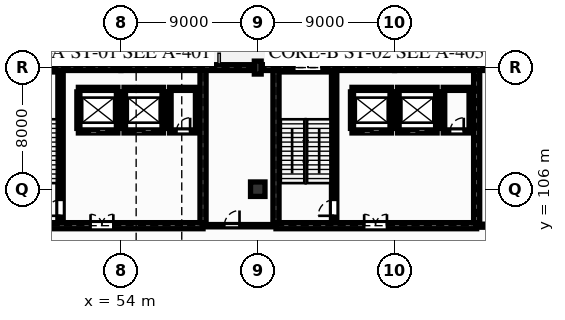
"""IFC4 building model, lengths in metres.
Left out: names, types, materials, properties, quantities, classifications, styles, units other than length and angle.
Written with IfcOpenShell. Run it as: python <this file> out.ifc"""

import sys

from ifc_helpers import new_model, si_unit, direction, frame, frame_2d, origin, origin_2d, place, context, subcontext, project, spatial, rectangle, extrude, element, fill, save


model = new_model("IFC4")
c1 = context("Model", 3, precision=1e-05, world=origin(), true_north=direction((0.0, 1.0)))
c2 = subcontext(c1, "Body", "Model", "MODEL_VIEW")
j1 = project(units=[si_unit("LENGTHUNIT", "METRE"), si_unit("PLANEANGLEUNIT", "RADIAN")], contexts=[c1])
p1 = place(None, origin())
s1 = spatial("IfcSite", under=j1, at=p1, CompositionType="ELEMENT")
p2 = place(p1, origin())
s2 = spatial("IfcBuilding", under=s1, at=p2, CompositionType="ELEMENT")
p3 = place(p2, origin())
s3 = spatial("IfcBuildingStorey", under=s2, at=p3, CompositionType="ELEMENT", Elevation=0.0)
p4 = place(p3, frame((63.0, 106.0, 0.0), z_axis=(0.0, 0.0, 1.0), x_axis=(1.0, 0.0, 0.0)))
e1 = element("IfcColumn", 1, at=p4, inside=s3, PredefinedType="COLUMN", context=c2, shape_type="SweptSolid", body=[
    extrude(rectangle(XDim=0.95, YDim=0.95, at=origin_2d()), origin(), (0.0, 0.0, 1.0), 5.1),
])
p5 = place(p3, frame((63.0, 114.0, 0.0), z_axis=(0.0, 0.0, 1.0), x_axis=(0.0, 1.0, 0.0)))
e2 = element("IfcColumn", 2, at=p5, inside=s3, PredefinedType="COLUMN", context=c2, shape_type="SweptSolid", body=[
    extrude(rectangle(XDim=0.45, YDim=0.85, at=origin_2d()), origin(), (0.0, 0.0, 1.0), 5.1),
])
p6 = place(p3, frame((45.0, 114.0, 0.0), z_axis=(0.0, 0.0, 1.0), x_axis=(1.0, 0.0, 0.0)))
e3 = element("IfcWall", 3, at=p6, inside=s3, PredefinedType="SOLIDWALL", context=c2, shape_type="SweptSolid", body=[
    extrude(rectangle(XDim=9.0, YDim=0.38, at=frame_2d((4.5, 0.0))), origin(), (0.0, 0.0, 1.0), 4.8),
])
p7 = place(p6, frame((2.4, 0.0, 0.0)))
e4 = element("IfcOpeningElement", 4, at=p7, cuts=e3, PredefinedType="OPENING", context=c2, shape_type="SweptSolid", body=[
    extrude(rectangle(XDim=1.8, YDim=2.4, at=frame_2d((0.9, 1.2))), frame((0.0, 0.2, 0.0), z_axis=(0.0, -1.0, 0.0), x_axis=(1.0, 0.0, 0.0)), (0.0, 0.0, 1.0), 0.4),
])
p8 = place(p3, frame((54.0, 114.0, 0.0), z_axis=(0.0, 0.0, 1.0), x_axis=(1.0, 0.0, 0.0)))
e5 = element("IfcWall", 5, at=p8, inside=s3, PredefinedType="SOLIDWALL", context=c2, shape_type="SweptSolid", body=[
    extrude(rectangle(XDim=9.0, YDim=0.38, at=frame_2d((4.5, 0.0))), origin(), (0.0, 0.0, 1.0), 4.8),
])
p9 = place(p8, frame((2.2, 0.0, 1.15)))
e6 = element("IfcOpeningElement", 6, at=p9, cuts=e5, PredefinedType="OPENING", context=c2, shape_type="SweptSolid", body=[
    extrude(rectangle(XDim=0.75, YDim=2.2, at=frame_2d((0.375, 1.1))), frame((0.0, 0.2, 0.0), z_axis=(0.0, -1.0, 0.0), x_axis=(1.0, 0.0, 0.0)), (0.0, 0.0, 1.0), 0.4),
])
p10 = place(p3, frame((63.0, 114.0, 0.0), z_axis=(0.0, 0.0, 1.0), x_axis=(1.0, 0.0, 0.0)))
e7 = element("IfcWall", 7, at=p10, inside=s3, PredefinedType="SOLIDWALL", context=c2, shape_type="SweptSolid", body=[
    extrude(rectangle(XDim=9.0, YDim=0.38, at=frame_2d((4.5, 0.0))), origin(), (0.0, 0.0, 1.0), 4.8),
])
p11 = place(p10, frame((2.4, 0.0, 0.0)))
e8 = element("IfcOpeningElement", 8, at=p11, cuts=e7, PredefinedType="OPENING", context=c2, shape_type="SweptSolid", body=[
    extrude(rectangle(XDim=1.8, YDim=2.4, at=frame_2d((0.9, 1.2))), frame((0.0, 0.2, 0.0), z_axis=(0.0, -1.0, 0.0), x_axis=(1.0, 0.0, 0.0)), (0.0, 0.0, 1.0), 0.4),
])
p12 = place(p3, frame((72.0, 114.0, 0.0), z_axis=(0.0, 0.0, 1.0), x_axis=(1.0, 0.0, 0.0)))
e9 = element("IfcWall", 9, at=p12, inside=s3, PredefinedType="SOLIDWALL", context=c2, shape_type="SweptSolid", body=[
    extrude(rectangle(XDim=9.0, YDim=0.38, at=frame_2d((4.5, 0.0))), origin(), (0.0, 0.0, 1.0), 4.8),
])
p13 = place(p12, frame((2.2, 0.0, 1.15)))
e10 = element("IfcOpeningElement", 10, at=p13, cuts=e9, PredefinedType="OPENING", context=c2, shape_type="SweptSolid", body=[
    extrude(rectangle(XDim=0.75, YDim=2.2, at=frame_2d((0.375, 1.1))), frame((0.0, 0.2, 0.0), z_axis=(0.0, -1.0, 0.0), x_axis=(1.0, 0.0, 0.0)), (0.0, 0.0, 1.0), 0.4),
])
p14 = place(p3, frame((46.2, 103.6, 0.0), z_axis=(0.0, 0.0, 1.0), x_axis=(1.0, 0.0, 0.0)))
e11 = element("IfcWall", 11, at=p14, inside=s3, PredefinedType="SHEAR", context=c2, shape_type="SweptSolid", body=[
    extrude(rectangle(XDim=13.2, YDim=0.4, at=frame_2d((6.6, 0.0))), origin(), (0.0, 0.0, 1.0), 4.8),
])
p15 = place(p14, frame((5.8, 0.0, 0.0)))
e12 = element("IfcOpeningElement", 12, at=p15, cuts=e11, PredefinedType="OPENING", context=c2, shape_type="SweptSolid", body=[
    extrude(rectangle(XDim=1.5, YDim=2.2, at=frame_2d((0.75, 1.1))), frame((0.0, 0.21, 0.0), z_axis=(0.0, -1.0, 0.0), x_axis=(1.0, 0.0, 0.0)), (0.0, 0.0, 1.0), 0.42),
])
p16 = place(p3, frame((59.4, 103.8, 0.0), z_axis=(0.0, 0.0, 1.0), x_axis=(0.0, 1.0, 0.0)))
e13 = element("IfcWall", 13, at=p16, inside=s3, PredefinedType="SHEAR", context=c2, shape_type="SweptSolid", body=[
    extrude(rectangle(XDim=10.01, YDim=0.4, at=frame_2d((5.005, 0.0))), origin(), (0.0, 0.0, 1.0), 4.8),
])
p17 = place(p3, frame((50.025, 103.8, 0.0), z_axis=(0.0, 0.0, 1.0), x_axis=(0.0, 1.0, 0.0)))
e14 = element("IfcWall", 14, at=p17, inside=s3, PredefinedType="SHEAR", context=c2, shape_type="SweptSolid", body=[
    extrude(rectangle(XDim=10.01, YDim=0.35, at=frame_2d((5.005, 0.0))), origin(), (0.0, 0.0, 1.0), 4.8),
])
p18 = place(p17, frame((0.45, 0.0, 0.0)))
e15 = element("IfcOpeningElement", 15, at=p18, cuts=e14, PredefinedType="OPENING", context=c2, shape_type="SweptSolid", body=[
    extrude(rectangle(XDim=1.05, YDim=2.2, at=frame_2d((0.525, 1.1))), frame((0.0, 0.185, 0.0), z_axis=(0.0, -1.0, 0.0), x_axis=(1.0, 0.0, 0.0)), (0.0, 0.0, 1.0), 0.37),
])
p19 = place(p3, frame((51.2, 109.8, 0.0), z_axis=(0.0, 0.0, 1.0), x_axis=(1.0, 0.0, 0.0)))
e16 = element("IfcWall", 16, at=p19, inside=s3, PredefinedType="PARTITIONING", context=c2, shape_type="SweptSolid", body=[
    extrude(rectangle(XDim=2.6, YDim=0.2, at=frame_2d((1.3, 0.0))), origin(), (0.0, 0.0, 1.0), 4.8),
])
p20 = place(p19, frame((0.75, 0.0, 0.0)))
e17 = element("IfcOpeningElement", 17, at=p20, cuts=e16, PredefinedType="OPENING", context=c2, shape_type="SweptSolid", body=[
    extrude(rectangle(XDim=1.1, YDim=2.15, at=frame_2d((0.55, 1.075))), frame((0.0, 0.11, 0.0), z_axis=(0.0, -1.0, 0.0), x_axis=(1.0, 0.0, 0.0)), (0.0, 0.0, 1.0), 0.22),
])
p21 = place(p3, frame((51.2, 112.6, 0.0), z_axis=(0.0, 0.0, 1.0), x_axis=(1.0, 0.0, 0.0)))
e18 = element("IfcWall", 18, at=p21, inside=s3, PredefinedType="PARTITIONING", context=c2, shape_type="SweptSolid", body=[
    extrude(rectangle(XDim=2.6, YDim=0.2, at=frame_2d((1.3, 0.0))), origin(), (0.0, 0.0, 1.0), 4.8),
])
for number, where, z_axis, x_axis in (
    (19, (51.2, 110.0, 0.0), (0.0, 0.0, 1.0), (0.0, 1.0, 0.0)),
    (20, (53.8, 110.0, 0.0), (0.0, 0.0, 1.0), (0.0, 1.0, 0.0)),
):
    element("IfcWall", number, at=place(p3, frame(where, z_axis=z_axis, x_axis=x_axis)), inside=s3, PredefinedType="PARTITIONING", context=c2, shape_type="SweptSolid", body=[
        extrude(rectangle(XDim=2.4, YDim=0.2, at=frame_2d((1.2, 0.0))), origin(), (0.0, 0.0, 1.0), 4.8),
    ])
p22 = place(p3, frame((54.2, 109.8, 0.0), z_axis=(0.0, 0.0, 1.0), x_axis=(1.0, 0.0, 0.0)))
e21 = element("IfcWall", 21, at=p22, inside=s3, PredefinedType="PARTITIONING", context=c2, shape_type="SweptSolid", body=[
    extrude(rectangle(XDim=2.6, YDim=0.2, at=frame_2d((1.3, 0.0))), origin(), (0.0, 0.0, 1.0), 4.8),
])
p23 = place(p22, frame((0.75, 0.0, 0.0)))
e22 = element("IfcOpeningElement", 22, at=p23, cuts=e21, PredefinedType="OPENING", context=c2, shape_type="SweptSolid", body=[
    extrude(rectangle(XDim=1.1, YDim=2.15, at=frame_2d((0.55, 1.075))), frame((0.0, 0.11, 0.0), z_axis=(0.0, -1.0, 0.0), x_axis=(1.0, 0.0, 0.0)), (0.0, 0.0, 1.0), 0.22),
])
p24 = place(p3, frame((54.2, 112.6, 0.0), z_axis=(0.0, 0.0, 1.0), x_axis=(1.0, 0.0, 0.0)))
e23 = element("IfcWall", 23, at=p24, inside=s3, PredefinedType="PARTITIONING", context=c2, shape_type="SweptSolid", body=[
    extrude(rectangle(XDim=2.6, YDim=0.2, at=frame_2d((1.3, 0.0))), origin(), (0.0, 0.0, 1.0), 4.8),
])
for number, where, z_axis, x_axis in (
    (24, (54.2, 110.0, 0.0), (0.0, 0.0, 1.0), (0.0, 1.0, 0.0)),
    (25, (56.8, 110.0, 0.0), (0.0, 0.0, 1.0), (0.0, 1.0, 0.0)),
):
    element("IfcWall", number, at=place(p3, frame(where, z_axis=z_axis, x_axis=x_axis)), inside=s3, PredefinedType="PARTITIONING", context=c2, shape_type="SweptSolid", body=[
        extrude(rectangle(XDim=2.4, YDim=0.2, at=frame_2d((1.2, 0.0))), origin(), (0.0, 0.0, 1.0), 4.8),
    ])
p25 = place(p3, frame((57.2, 109.8, 0.0), z_axis=(0.0, 0.0, 1.0), x_axis=(1.0, 0.0, 0.0)))
e26 = element("IfcWall", 26, at=p25, inside=s3, PredefinedType="PARTITIONING", context=c2, shape_type="SweptSolid", body=[
    extrude(rectangle(XDim=1.8, YDim=0.2, at=frame_2d((0.9, 0.0))), origin(), (0.0, 0.0, 1.0), 4.8),
])
p26 = place(p25, frame((0.45, 0.0, 0.0)))
e27 = element("IfcOpeningElement", 27, at=p26, cuts=e26, PredefinedType="OPENING", context=c2, shape_type="SweptSolid", body=[
    extrude(rectangle(XDim=0.9, YDim=2.1, at=frame_2d((0.45, 1.05))), frame((0.0, 0.11, 0.0), z_axis=(0.0, -1.0, 0.0), x_axis=(1.0, 0.0, 0.0)), (0.0, 0.0, 1.0), 0.22),
])
p27 = place(p3, frame((57.2, 112.6, 0.0), z_axis=(0.0, 0.0, 1.0), x_axis=(1.0, 0.0, 0.0)))
e28 = element("IfcWall", 28, at=p27, inside=s3, PredefinedType="PARTITIONING", context=c2, shape_type="SweptSolid", body=[
    extrude(rectangle(XDim=1.8, YDim=0.2, at=frame_2d((0.9, 0.0))), origin(), (0.0, 0.0, 1.0), 4.8),
])
for number, where, z_axis, x_axis in (
    (29, (57.2, 110.0, 0.0), (0.0, 0.0, 1.0), (0.0, 1.0, 0.0)),
    (30, (59.0, 110.0, 0.0), (0.0, 0.0, 1.0), (0.0, 1.0, 0.0)),
):
    element("IfcWall", number, at=place(p3, frame(where, z_axis=z_axis, x_axis=x_axis)), inside=s3, PredefinedType="PARTITIONING", context=c2, shape_type="SweptSolid", body=[
        extrude(rectangle(XDim=2.4, YDim=0.2, at=frame_2d((1.2, 0.0))), origin(), (0.0, 0.0, 1.0), 4.8),
    ])
p28 = place(p3, frame((64.2, 103.6, 0.0), z_axis=(0.0, 0.0, 1.0), x_axis=(1.0, 0.0, 0.0)))
e31 = element("IfcWall", 31, at=p28, inside=s3, PredefinedType="SHEAR", context=c2, shape_type="SweptSolid", body=[
    extrude(rectangle(XDim=13.2, YDim=0.4, at=frame_2d((6.6, 0.0))), origin(), (0.0, 0.0, 1.0), 4.8),
])
p29 = place(p28, frame((5.8, 0.0, 0.0)))
e32 = element("IfcOpeningElement", 32, at=p29, cuts=e31, PredefinedType="OPENING", context=c2, shape_type="SweptSolid", body=[
    extrude(rectangle(XDim=1.5, YDim=2.2, at=frame_2d((0.75, 1.1))), frame((0.0, 0.21, 0.0), z_axis=(0.0, -1.0, 0.0), x_axis=(1.0, 0.0, 0.0)), (0.0, 0.0, 1.0), 0.42),
])
for number, where, z_axis, x_axis in (
    (33, (64.2, 103.8, 0.0), (0.0, 0.0, 1.0), (0.0, 1.0, 0.0)),
    (34, (77.4, 103.8, 0.0), (0.0, 0.0, 1.0), (0.0, 1.0, 0.0)),
):
    element("IfcWall", number, at=place(p3, frame(where, z_axis=z_axis, x_axis=x_axis)), inside=s3, PredefinedType="SHEAR", context=c2, shape_type="SweptSolid", body=[
        extrude(rectangle(XDim=10.01, YDim=0.4, at=frame_2d((5.005, 0.0))), origin(), (0.0, 0.0, 1.0), 4.8),
    ])
p30 = place(p3, frame((68.025, 103.8, 0.0), z_axis=(0.0, 0.0, 1.0), x_axis=(0.0, 1.0, 0.0)))
e35 = element("IfcWall", 35, at=p30, inside=s3, PredefinedType="SHEAR", context=c2, shape_type="SweptSolid", body=[
    extrude(rectangle(XDim=10.01, YDim=0.35, at=frame_2d((5.005, 0.0))), origin(), (0.0, 0.0, 1.0), 4.8),
])
p31 = place(p30, frame((0.45, 0.0, 0.0)))
e36 = element("IfcOpeningElement", 36, at=p31, cuts=e35, PredefinedType="OPENING", context=c2, shape_type="SweptSolid", body=[
    extrude(rectangle(XDim=1.05, YDim=2.2, at=frame_2d((0.525, 1.1))), frame((0.0, 0.185, 0.0), z_axis=(0.0, -1.0, 0.0), x_axis=(1.0, 0.0, 0.0)), (0.0, 0.0, 1.0), 0.37),
])
p32 = place(p3, frame((69.2, 109.8, 0.0), z_axis=(0.0, 0.0, 1.0), x_axis=(1.0, 0.0, 0.0)))
e37 = element("IfcWall", 37, at=p32, inside=s3, PredefinedType="PARTITIONING", context=c2, shape_type="SweptSolid", body=[
    extrude(rectangle(XDim=2.6, YDim=0.2, at=frame_2d((1.3, 0.0))), origin(), (0.0, 0.0, 1.0), 4.8),
])
p33 = place(p32, frame((0.75, 0.0, 0.0)))
e38 = element("IfcOpeningElement", 38, at=p33, cuts=e37, PredefinedType="OPENING", context=c2, shape_type="SweptSolid", body=[
    extrude(rectangle(XDim=1.1, YDim=2.15, at=frame_2d((0.55, 1.075))), frame((0.0, 0.11, 0.0), z_axis=(0.0, -1.0, 0.0), x_axis=(1.0, 0.0, 0.0)), (0.0, 0.0, 1.0), 0.22),
])
p34 = place(p3, frame((69.2, 112.6, 0.0), z_axis=(0.0, 0.0, 1.0), x_axis=(1.0, 0.0, 0.0)))
e39 = element("IfcWall", 39, at=p34, inside=s3, PredefinedType="PARTITIONING", context=c2, shape_type="SweptSolid", body=[
    extrude(rectangle(XDim=2.6, YDim=0.2, at=frame_2d((1.3, 0.0))), origin(), (0.0, 0.0, 1.0), 4.8),
])
for number, where, z_axis, x_axis in (
    (40, (69.2, 110.0, 0.0), (0.0, 0.0, 1.0), (0.0, 1.0, 0.0)),
    (41, (71.8, 110.0, 0.0), (0.0, 0.0, 1.0), (0.0, 1.0, 0.0)),
):
    element("IfcWall", number, at=place(p3, frame(where, z_axis=z_axis, x_axis=x_axis)), inside=s3, PredefinedType="PARTITIONING", context=c2, shape_type="SweptSolid", body=[
        extrude(rectangle(XDim=2.4, YDim=0.2, at=frame_2d((1.2, 0.0))), origin(), (0.0, 0.0, 1.0), 4.8),
    ])
p35 = place(p3, frame((72.2, 109.8, 0.0), z_axis=(0.0, 0.0, 1.0), x_axis=(1.0, 0.0, 0.0)))
e42 = element("IfcWall", 42, at=p35, inside=s3, PredefinedType="PARTITIONING", context=c2, shape_type="SweptSolid", body=[
    extrude(rectangle(XDim=2.6, YDim=0.2, at=frame_2d((1.3, 0.0))), origin(), (0.0, 0.0, 1.0), 4.8),
])
p36 = place(p35, frame((0.75, 0.0, 0.0)))
e43 = element("IfcOpeningElement", 43, at=p36, cuts=e42, PredefinedType="OPENING", context=c2, shape_type="SweptSolid", body=[
    extrude(rectangle(XDim=1.1, YDim=2.15, at=frame_2d((0.55, 1.075))), frame((0.0, 0.11, 0.0), z_axis=(0.0, -1.0, 0.0), x_axis=(1.0, 0.0, 0.0)), (0.0, 0.0, 1.0), 0.22),
])
p37 = place(p3, frame((72.2, 112.6, 0.0), z_axis=(0.0, 0.0, 1.0), x_axis=(1.0, 0.0, 0.0)))
e44 = element("IfcWall", 44, at=p37, inside=s3, PredefinedType="PARTITIONING", context=c2, shape_type="SweptSolid", body=[
    extrude(rectangle(XDim=2.6, YDim=0.2, at=frame_2d((1.3, 0.0))), origin(), (0.0, 0.0, 1.0), 4.8),
])
for number, where, z_axis, x_axis in (
    (45, (72.2, 110.0, 0.0), (0.0, 0.0, 1.0), (0.0, 1.0, 0.0)),
    (46, (74.8, 110.0, 0.0), (0.0, 0.0, 1.0), (0.0, 1.0, 0.0)),
):
    element("IfcWall", number, at=place(p3, frame(where, z_axis=z_axis, x_axis=x_axis)), inside=s3, PredefinedType="PARTITIONING", context=c2, shape_type="SweptSolid", body=[
        extrude(rectangle(XDim=2.4, YDim=0.2, at=frame_2d((1.2, 0.0))), origin(), (0.0, 0.0, 1.0), 4.8),
    ])
p38 = place(p3, frame((75.2, 109.8, 0.0), z_axis=(0.0, 0.0, 1.0), x_axis=(1.0, 0.0, 0.0)))
e47 = element("IfcWall", 47, at=p38, inside=s3, PredefinedType="PARTITIONING", context=c2, shape_type="SweptSolid", body=[
    extrude(rectangle(XDim=1.8, YDim=0.2, at=frame_2d((0.9, 0.0))), origin(), (0.0, 0.0, 1.0), 4.8),
])
p39 = place(p38, frame((0.45, 0.0, 0.0)))
e48 = element("IfcOpeningElement", 48, at=p39, cuts=e47, PredefinedType="OPENING", context=c2, shape_type="SweptSolid", body=[
    extrude(rectangle(XDim=0.9, YDim=2.1, at=frame_2d((0.45, 1.05))), frame((0.0, 0.11, 0.0), z_axis=(0.0, -1.0, 0.0), x_axis=(1.0, 0.0, 0.0)), (0.0, 0.0, 1.0), 0.22),
])
p40 = place(p3, frame((75.2, 112.6, 0.0), z_axis=(0.0, 0.0, 1.0), x_axis=(1.0, 0.0, 0.0)))
e49 = element("IfcWall", 49, at=p40, inside=s3, PredefinedType="PARTITIONING", context=c2, shape_type="SweptSolid", body=[
    extrude(rectangle(XDim=1.8, YDim=0.2, at=frame_2d((0.9, 0.0))), origin(), (0.0, 0.0, 1.0), 4.8),
])
for number, where, z_axis, x_axis in (
    (50, (75.2, 110.0, 0.0), (0.0, 0.0, 1.0), (0.0, 1.0, 0.0)),
    (51, (77.0, 110.0, 0.0), (0.0, 0.0, 1.0), (0.0, 1.0, 0.0)),
):
    element("IfcWall", number, at=place(p3, frame(where, z_axis=z_axis, x_axis=x_axis)), inside=s3, PredefinedType="PARTITIONING", context=c2, shape_type="SweptSolid", body=[
        extrude(rectangle(XDim=2.4, YDim=0.2, at=frame_2d((1.2, 0.0))), origin(), (0.0, 0.0, 1.0), 4.8),
    ])
p41 = place(p3, frame((59.4, 103.6, 0.0), z_axis=(0.0, 0.0, 1.0), x_axis=(1.0, 0.0, 0.0)))
e52 = element("IfcWall", 52, at=p41, inside=s3, PredefinedType="PARTITIONING", context=c2, shape_type="SweptSolid", body=[
    extrude(rectangle(XDim=4.8, YDim=0.15, at=frame_2d((2.4, 0.0))), origin(), (0.0, 0.0, 1.0), 4.8),
])
p42 = place(p41, frame((1.4, 0.0, 0.0)))
e53 = element("IfcOpeningElement", 53, at=p42, cuts=e52, PredefinedType="OPENING", context=c2, shape_type="SweptSolid", body=[
    extrude(rectangle(XDim=1.0, YDim=2.15, at=frame_2d((0.5, 1.075))), frame((0.0, 0.085, 0.0), z_axis=(0.0, -1.0, 0.0), x_axis=(1.0, 0.0, 0.0)), (0.0, 0.0, 1.0), 0.17),
])
p43 = place(p3, frame((77.4, 103.6, 0.0), z_axis=(0.0, 0.0, 1.0), x_axis=(1.0, 0.0, 0.0)))
e54 = element("IfcWall", 54, at=p43, inside=s3, PredefinedType="PARTITIONING", context=c2, shape_type="SweptSolid", body=[
    extrude(rectangle(XDim=21.6, YDim=0.2, at=frame_2d((10.8, 0.0))), origin(), (0.0, 0.0, 1.0), 4.8),
])
p44 = place(p43, frame((9.9, 0.0, 0.0)))
e55 = element("IfcOpeningElement", 55, at=p44, cuts=e54, PredefinedType="OPENING", context=c2, shape_type="SweptSolid", body=[
    extrude(rectangle(XDim=1.6, YDim=2.2, at=frame_2d((0.8, 1.1))), frame((0.0, 0.11, 0.0), z_axis=(0.0, -1.0, 0.0), x_axis=(1.0, 0.0, 0.0)), (0.0, 0.0, 1.0), 0.22),
])
p45 = place(p9, origin())
e56 = element("IfcWindow", 56, at=p45, inside=s3, PartitioningType="SINGLE_PANEL", PredefinedType="WINDOW", context=c2, shape_type="SweptSolid", body=[
    extrude(rectangle(XDim=0.75, YDim=2.2, at=frame_2d((0.375, 1.1))), frame((0.0, 0.03, 0.0), z_axis=(0.0, -1.0, 0.0), x_axis=(1.0, 0.0, 0.0)), (0.0, 0.0, 1.0), 0.06),
])
fill(e6, e56)
p46 = place(p11, origin())
e57 = element("IfcDoor", 57, at=p46, inside=s3, OperationType="DOUBLE_DOOR_SINGLE_SWING", PredefinedType="DOOR", context=c2, shape_type="SweptSolid", body=[
    extrude(rectangle(XDim=1.8, YDim=2.4, at=frame_2d((0.9, 1.2))), frame((0.0, 0.025, 0.0), z_axis=(0.0, -1.0, 0.0), x_axis=(1.0, 0.0, 0.0)), (0.0, 0.0, 1.0), 0.05),
])
fill(e8, e57)
p47 = place(p13, origin())
e58 = element("IfcWindow", 58, at=p47, inside=s3, PartitioningType="SINGLE_PANEL", PredefinedType="WINDOW", context=c2, shape_type="SweptSolid", body=[
    extrude(rectangle(XDim=0.75, YDim=2.2, at=frame_2d((0.375, 1.1))), frame((0.0, 0.03, 0.0), z_axis=(0.0, -1.0, 0.0), x_axis=(1.0, 0.0, 0.0)), (0.0, 0.0, 1.0), 0.06),
])
fill(e10, e58)
p48 = place(p15, origin())
e59 = element("IfcDoor", 59, at=p48, inside=s3, OperationType="DOUBLE_DOOR_SINGLE_SWING", PredefinedType="DOOR", context=c2, shape_type="SweptSolid", body=[
    extrude(rectangle(XDim=1.5, YDim=2.2, at=frame_2d((0.75, 1.1))), frame((0.0, 0.025, 0.0), z_axis=(0.0, -1.0, 0.0), x_axis=(1.0, 0.0, 0.0)), (0.0, 0.0, 1.0), 0.05),
])
fill(e12, e59)
p49 = place(p18, origin())
e60 = element("IfcDoor", 60, at=p49, inside=s3, OperationType="SINGLE_SWING_LEFT", PredefinedType="DOOR", context=c2, shape_type="SweptSolid", body=[
    extrude(rectangle(XDim=1.05, YDim=2.2, at=frame_2d((0.525, 1.1))), frame((0.0, 0.025, 0.0), z_axis=(0.0, -1.0, 0.0), x_axis=(1.0, 0.0, 0.0)), (0.0, 0.0, 1.0), 0.05),
])
fill(e15, e60)
p50 = place(p20, origin())
e61 = element("IfcDoor", 61, at=p50, inside=s3, OperationType="SLIDING_TO_LEFT", PredefinedType="DOOR", context=c2, shape_type="SweptSolid", body=[
    extrude(rectangle(XDim=1.1, YDim=2.15, at=frame_2d((0.55, 1.075))), frame((0.0, 0.025, 0.0), z_axis=(0.0, -1.0, 0.0), x_axis=(1.0, 0.0, 0.0)), (0.0, 0.0, 1.0), 0.05),
])
fill(e17, e61)
p51 = place(p23, origin())
e62 = element("IfcDoor", 62, at=p51, inside=s3, OperationType="SLIDING_TO_RIGHT", PredefinedType="DOOR", context=c2, shape_type="SweptSolid", body=[
    extrude(rectangle(XDim=1.1, YDim=2.15, at=frame_2d((0.55, 1.075))), frame((0.0, 0.025, 0.0), z_axis=(0.0, -1.0, 0.0), x_axis=(1.0, 0.0, 0.0)), (0.0, 0.0, 1.0), 0.05),
])
fill(e22, e62)
p52 = place(p26, origin())
e63 = element("IfcDoor", 63, at=p52, inside=s3, OperationType="SINGLE_SWING_RIGHT", PredefinedType="DOOR", context=c2, shape_type="SweptSolid", body=[
    extrude(rectangle(XDim=0.9, YDim=2.1, at=frame_2d((0.45, 1.05))), frame((0.0, 0.025, 0.0), z_axis=(0.0, -1.0, 0.0), x_axis=(1.0, 0.0, 0.0)), (0.0, 0.0, 1.0), 0.05),
])
fill(e27, e63)
p53 = place(p29, origin())
e64 = element("IfcDoor", 64, at=p53, inside=s3, OperationType="DOUBLE_DOOR_SINGLE_SWING", PredefinedType="DOOR", context=c2, shape_type="SweptSolid", body=[
    extrude(rectangle(XDim=1.5, YDim=2.2, at=frame_2d((0.75, 1.1))), frame((0.0, 0.025, 0.0), z_axis=(0.0, -1.0, 0.0), x_axis=(1.0, 0.0, 0.0)), (0.0, 0.0, 1.0), 0.05),
])
fill(e32, e64)
p54 = place(p31, origin())
e65 = element("IfcDoor", 65, at=p54, inside=s3, OperationType="SINGLE_SWING_LEFT", PredefinedType="DOOR", context=c2, shape_type="SweptSolid", body=[
    extrude(rectangle(XDim=1.05, YDim=2.2, at=frame_2d((0.525, 1.1))), frame((0.0, 0.025, 0.0), z_axis=(0.0, -1.0, 0.0), x_axis=(1.0, 0.0, 0.0)), (0.0, 0.0, 1.0), 0.05),
])
fill(e36, e65)
p55 = place(p33, origin())
e66 = element("IfcDoor", 66, at=p55, inside=s3, OperationType="SLIDING_TO_LEFT", PredefinedType="DOOR", context=c2, shape_type="SweptSolid", body=[
    extrude(rectangle(XDim=1.1, YDim=2.15, at=frame_2d((0.55, 1.075))), frame((0.0, 0.025, 0.0), z_axis=(0.0, -1.0, 0.0), x_axis=(1.0, 0.0, 0.0)), (0.0, 0.0, 1.0), 0.05),
])
fill(e38, e66)
p56 = place(p36, origin())
e67 = element("IfcDoor", 67, at=p56, inside=s3, OperationType="SLIDING_TO_RIGHT", PredefinedType="DOOR", context=c2, shape_type="SweptSolid", body=[
    extrude(rectangle(XDim=1.1, YDim=2.15, at=frame_2d((0.55, 1.075))), frame((0.0, 0.025, 0.0), z_axis=(0.0, -1.0, 0.0), x_axis=(1.0, 0.0, 0.0)), (0.0, 0.0, 1.0), 0.05),
])
fill(e43, e67)
p57 = place(p39, origin())
e68 = element("IfcDoor", 68, at=p57, inside=s3, OperationType="SINGLE_SWING_RIGHT", PredefinedType="DOOR", context=c2, shape_type="SweptSolid", body=[
    extrude(rectangle(XDim=0.9, YDim=2.1, at=frame_2d((0.45, 1.05))), frame((0.0, 0.025, 0.0), z_axis=(0.0, -1.0, 0.0), x_axis=(1.0, 0.0, 0.0)), (0.0, 0.0, 1.0), 0.05),
])
fill(e48, e68)
p58 = place(p42, origin())
e69 = element("IfcDoor", 69, at=p58, inside=s3, OperationType="SINGLE_SWING_RIGHT", PredefinedType="DOOR", context=c2, shape_type="SweptSolid", body=[
    extrude(rectangle(XDim=1.0, YDim=2.15, at=frame_2d((0.5, 1.075))), frame((0.0, 0.025, 0.0), z_axis=(0.0, -1.0, 0.0), x_axis=(1.0, 0.0, 0.0)), (0.0, 0.0, 1.0), 0.05),
])
fill(e53, e69)
save(model, sys.argv[1])
